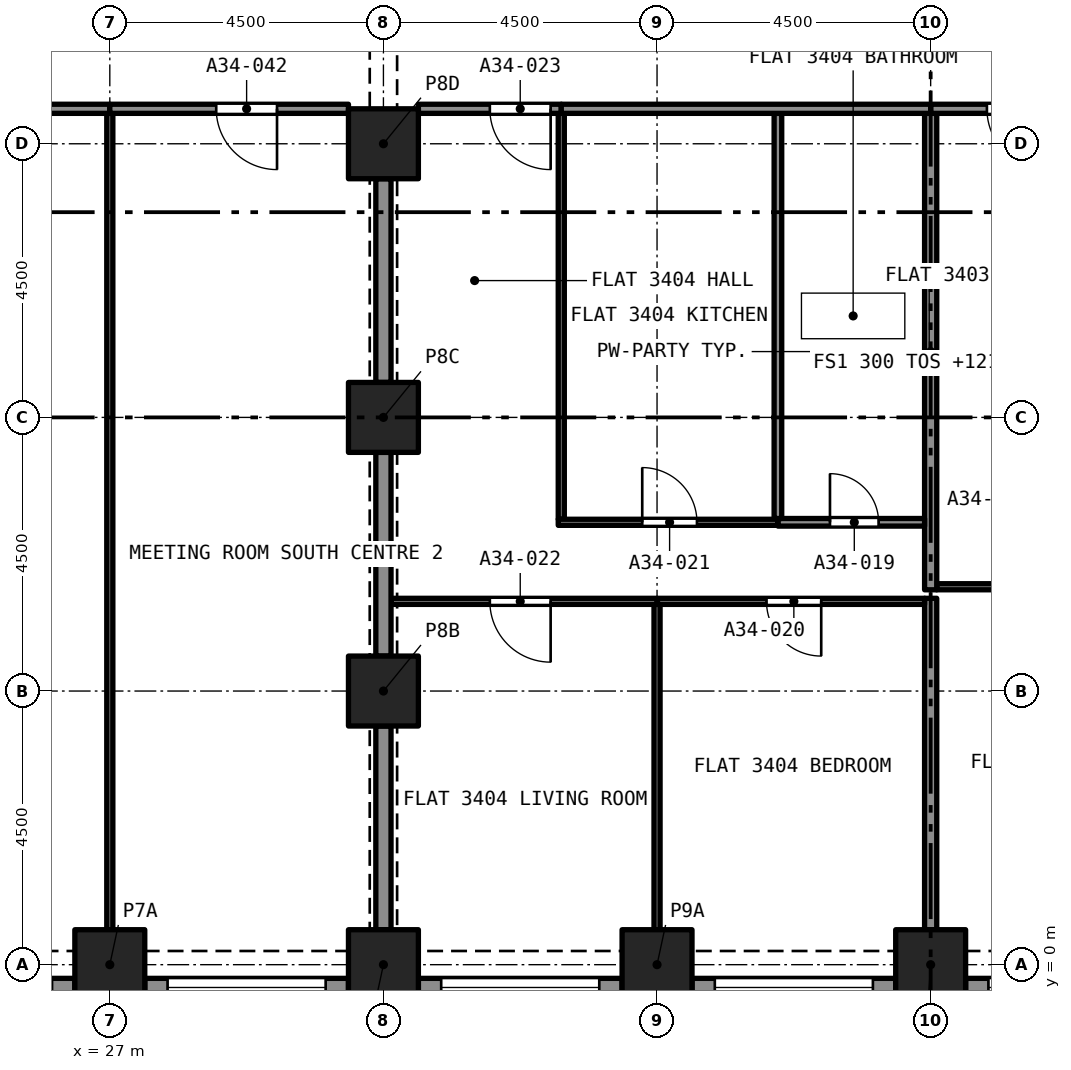
"""IFC4 building model, lengths in metres.
Left out: names, types, materials, properties, quantities, classifications, styles, units other than length and angle.
Written with IfcOpenShell. Run it as: python <this file> out.ifc"""

import sys

from ifc_helpers import new_model, si_unit, direction, frame, frame_2d, origin, origin_2d, place, context, subcontext, project, spatial, rectangle, extrude, element, fill, save


model = new_model("IFC4")
c1 = context("Model", 3, precision=1e-05, world=origin(), true_north=direction((0.0, 1.0)))
c2 = subcontext(c1, "Body", "Model", "MODEL_VIEW")
j1 = project(units=[si_unit("LENGTHUNIT", "METRE"), si_unit("PLANEANGLEUNIT", "RADIAN")], contexts=[c1])
p1 = place(None, origin())
s1 = spatial("IfcSite", under=j1, at=p1, CompositionType="ELEMENT")
p2 = place(p1, origin())
s2 = spatial("IfcBuilding", under=s1, at=p2, CompositionType="ELEMENT")
p3 = place(p2, frame((0.0, 0.0, 121.6)))
s3 = spatial("IfcBuildingStorey", under=s2, at=p3, CompositionType="ELEMENT", Elevation=121.6)
for number, where, z_axis, x_axis in (
    (1, (27.0, 0.0, 0.0), (0.0, 0.0, 1.0), (1.0, 0.0, 0.0)),
    (2, (31.5, 0.0, 0.0), (0.0, 0.0, 1.0), (1.0, 0.0, 0.0)),
    (3, (36.0, 0.0, 0.0), (0.0, 0.0, 1.0), (1.0, 0.0, 0.0)),
    (4, (40.5, 0.0, 0.0), (0.0, 0.0, 1.0), (1.0, 0.0, 0.0)),
    (5, (31.5, 4.5, 0.0), (0.0, 0.0, 1.0), (1.0, 0.0, 0.0)),
    (6, (31.5, 9.0, 0.0), (0.0, 0.0, 1.0), (1.0, 0.0, 0.0)),
    (7, (31.5, 13.5, 0.0), (0.0, 0.0, 1.0), (1.0, 0.0, 0.0)),
):
    element("IfcColumn", number, at=place(p3, frame(where, z_axis=z_axis, x_axis=x_axis)), inside=s3, PredefinedType="COLUMN", context=c2, shape_type="SweptSolid", body=[
        extrude(rectangle(XDim=1.15, YDim=1.15, at=origin_2d()), origin(), (0.0, 0.0, 1.0), 3.2),
    ])
p4 = place(p3, frame((26.425, -0.375, 0.0), z_axis=(0.0, 0.0, 1.0), x_axis=(-1.0, 0.0, 0.0)))
e8 = element("IfcWall", 8, at=p4, inside=s3, PredefinedType="SOLIDWALL", context=c2, shape_type="SweptSolid", body=[
    extrude(rectangle(XDim=3.35, YDim=0.3, at=frame_2d((1.675, 0.0))), origin(), (0.0, 0.0, 1.0), 3.2),
])
p5 = place(p4, frame((0.375, 0.0, 0.45)))
e9 = element("IfcOpeningElement", 9, at=p5, cuts=e8, PredefinedType="OPENING", context=c2, shape_type="SweptSolid", body=[
    extrude(rectangle(XDim=2.6, YDim=1.95, at=frame_2d((1.3, 0.975))), frame((0.0, 0.16, 0.0), z_axis=(0.0, -1.0, 0.0), x_axis=(1.0, 0.0, 0.0)), (0.0, 0.0, 1.0), 0.32),
])
p6 = place(p3, frame((30.925, -0.375, 0.0), z_axis=(0.0, 0.0, 1.0), x_axis=(-1.0, 0.0, 0.0)))
e10 = element("IfcWall", 10, at=p6, inside=s3, PredefinedType="SOLIDWALL", context=c2, shape_type="SweptSolid", body=[
    extrude(rectangle(XDim=3.35, YDim=0.3, at=frame_2d((1.675, 0.0))), origin(), (0.0, 0.0, 1.0), 3.2),
])
p7 = place(p6, frame((0.375, 0.0, 0.45)))
e11 = element("IfcOpeningElement", 11, at=p7, cuts=e10, PredefinedType="OPENING", context=c2, shape_type="SweptSolid", body=[
    extrude(rectangle(XDim=2.6, YDim=1.95, at=frame_2d((1.3, 0.975))), frame((0.0, 0.16, 0.0), z_axis=(0.0, -1.0, 0.0), x_axis=(1.0, 0.0, 0.0)), (0.0, 0.0, 1.0), 0.32),
])
p8 = place(p3, frame((35.425, -0.375, 0.0), z_axis=(0.0, 0.0, 1.0), x_axis=(-1.0, 0.0, 0.0)))
e12 = element("IfcWall", 12, at=p8, inside=s3, PredefinedType="SOLIDWALL", context=c2, shape_type="SweptSolid", body=[
    extrude(rectangle(XDim=3.35, YDim=0.3, at=frame_2d((1.675, 0.0))), origin(), (0.0, 0.0, 1.0), 3.2),
])
p9 = place(p8, frame((0.375, 0.0, 0.45)))
e13 = element("IfcOpeningElement", 13, at=p9, cuts=e12, PredefinedType="OPENING", context=c2, shape_type="SweptSolid", body=[
    extrude(rectangle(XDim=2.6, YDim=1.95, at=frame_2d((1.3, 0.975))), frame((0.0, 0.16, 0.0), z_axis=(0.0, -1.0, 0.0), x_axis=(1.0, 0.0, 0.0)), (0.0, 0.0, 1.0), 0.32),
])
p10 = place(p3, frame((39.925, -0.375, 0.0), z_axis=(0.0, 0.0, 1.0), x_axis=(-1.0, 0.0, 0.0)))
e14 = element("IfcWall", 14, at=p10, inside=s3, PredefinedType="SOLIDWALL", context=c2, shape_type="SweptSolid", body=[
    extrude(rectangle(XDim=3.35, YDim=0.3, at=frame_2d((1.675, 0.0))), origin(), (0.0, 0.0, 1.0), 3.2),
])
p11 = place(p10, frame((0.375, 0.0, 0.45)))
e15 = element("IfcOpeningElement", 15, at=p11, cuts=e14, PredefinedType="OPENING", context=c2, shape_type="SweptSolid", body=[
    extrude(rectangle(XDim=2.6, YDim=1.95, at=frame_2d((1.3, 0.975))), frame((0.0, 0.16, 0.0), z_axis=(0.0, -1.0, 0.0), x_axis=(1.0, 0.0, 0.0)), (0.0, 0.0, 1.0), 0.32),
])
p12 = place(p3, frame((44.425, -0.375, 0.0), z_axis=(0.0, 0.0, 1.0), x_axis=(-1.0, 0.0, 0.0)))
e16 = element("IfcWall", 16, at=p12, inside=s3, PredefinedType="SOLIDWALL", context=c2, shape_type="SweptSolid", body=[
    extrude(rectangle(XDim=3.35, YDim=0.3, at=frame_2d((1.675, 0.0))), origin(), (0.0, 0.0, 1.0), 3.2),
])
p13 = place(p12, frame((0.375, 0.0, 0.45)))
e17 = element("IfcOpeningElement", 17, at=p13, cuts=e16, PredefinedType="OPENING", context=c2, shape_type="SweptSolid", body=[
    extrude(rectangle(XDim=2.6, YDim=1.95, at=frame_2d((1.3, 0.975))), frame((0.0, 0.16, 0.0), z_axis=(0.0, -1.0, 0.0), x_axis=(1.0, 0.0, 0.0)), (0.0, 0.0, 1.0), 0.32),
])
p14 = place(p3, frame((44.95, 6.215, 0.0), z_axis=(0.0, 0.0, 1.0), x_axis=(-1.0, 0.0, 0.0)))
e18 = element("IfcWall", 18, at=p14, inside=s3, PredefinedType="PARTITIONING", context=c2, shape_type="SweptSolid", body=[
    extrude(rectangle(XDim=4.35, YDim=0.1, at=frame_2d((2.175, 0.0))), origin(), (0.0, 0.0, 1.0), 2.85),
])
p15 = place(p14, frame((1.75, 0.0, 0.0)))
e19 = element("IfcOpeningElement", 19, at=p15, cuts=e18, PredefinedType="OPENING", context=c2, shape_type="SweptSolid", body=[
    extrude(rectangle(XDim=0.9, YDim=2.1, at=frame_2d((0.45, 1.05))), frame((0.0, 0.06, 0.0), z_axis=(0.0, -1.0, 0.0), x_axis=(1.0, 0.0, 0.0)), (0.0, 0.0, 1.0), 0.12),
])
p16 = place(p3, frame((40.5, 0.575, 0.0), z_axis=(0.0, 0.0, 1.0), x_axis=(0.0, 1.0, 0.0)))
e20 = element("IfcWall", 20, at=p16, inside=s3, PredefinedType="PARTITIONING", context=c2, shape_type="SweptSolid", body=[
    extrude(rectangle(XDim=5.45, YDim=0.2, at=frame_2d((2.725, 0.0))), origin(), (0.0, 0.0, 1.0), 2.85),
])
p17 = place(p3, frame((40.5, 6.165, 0.0), z_axis=(0.0, 0.0, 1.0), x_axis=(0.0, 1.0, 0.0)))
e21 = element("IfcWall", 21, at=p17, inside=s3, PredefinedType="PARTITIONING", context=c2, shape_type="SweptSolid", body=[
    extrude(rectangle(XDim=7.835, YDim=0.2, at=frame_2d((3.917, 0.0))), origin(), (0.0, 0.0, 1.0), 2.85),
])
p18 = place(p3, frame((42.6, 14.075, 0.0), z_axis=(0.0, 0.0, 1.0), x_axis=(-1.0, 0.0, 0.0)))
e22 = element("IfcWall", 22, at=p18, inside=s3, PredefinedType="PARTITIONING", context=c2, shape_type="SweptSolid", body=[
    extrude(rectangle(XDim=2.1, YDim=0.15, at=frame_2d((1.05, 0.0))), origin(), (0.0, 0.0, 1.0), 2.85),
])
p19 = place(p18, frame((0.175, 0.0, 0.0)))
e23 = element("IfcOpeningElement", 23, at=p19, cuts=e22, PredefinedType="OPENING", context=c2, shape_type="SweptSolid", body=[
    extrude(rectangle(XDim=1.0, YDim=2.1, at=frame_2d((0.5, 1.05))), frame((0.0, 0.085, 0.0), z_axis=(0.0, -1.0, 0.0), x_axis=(1.0, 0.0, 0.0)), (0.0, 0.0, 1.0), 0.17),
])
p20 = place(p3, frame((37.988, 7.275, 0.0), z_axis=(0.0, 0.0, 1.0), x_axis=(1.0, 0.0, 0.0)))
e24 = element("IfcWall", 24, at=p20, inside=s3, PredefinedType="PARTITIONING", context=c2, shape_type="SweptSolid", body=[
    extrude(rectangle(XDim=2.412, YDim=0.125, at=frame_2d((1.206, 0.0))), origin(), (0.0, 0.0, 1.0), 2.85),
])
p21 = place(p20, frame((0.856, 0.0, 0.0)))
e25 = element("IfcOpeningElement", 25, at=p21, cuts=e24, PredefinedType="OPENING", context=c2, shape_type="SweptSolid", body=[
    extrude(rectangle(XDim=0.8, YDim=2.1, at=frame_2d((0.4, 1.05))), frame((0.0, 0.073, 0.0), z_axis=(0.0, -1.0, 0.0), x_axis=(1.0, 0.0, 0.0)), (0.0, 0.0, 1.0), 0.145),
])
p22 = place(p3, frame((37.988, 7.337, 0.0), z_axis=(0.0, 0.0, 1.0), x_axis=(0.0, 1.0, 0.0)))
e26 = element("IfcWall", 26, at=p22, inside=s3, PredefinedType="PARTITIONING", context=c2, shape_type="SweptSolid", body=[
    extrude(rectangle(XDim=6.663, YDim=0.125, at=frame_2d((3.331, 0.0))), origin(), (0.0, 0.0, 1.0), 2.85),
])
p23 = place(p3, frame((40.4, 5.975, 0.0), z_axis=(0.0, 0.0, 1.0), x_axis=(-1.0, 0.0, 0.0)))
e27 = element("IfcWall", 27, at=p23, inside=s3, PredefinedType="PARTITIONING", context=c2, shape_type="SweptSolid", body=[
    extrude(rectangle(XDim=4.4, YDim=0.1, at=frame_2d((2.2, 0.0))), origin(), (0.0, 0.0, 1.0), 2.85),
])
p24 = place(p23, frame((1.7, 0.0, 0.0)))
e28 = element("IfcOpeningElement", 28, at=p24, cuts=e27, PredefinedType="OPENING", context=c2, shape_type="SweptSolid", body=[
    extrude(rectangle(XDim=0.9, YDim=2.1, at=frame_2d((0.45, 1.05))), frame((0.0, 0.06, 0.0), z_axis=(0.0, -1.0, 0.0), x_axis=(1.0, 0.0, 0.0)), (0.0, 0.0, 1.0), 0.12),
])
p25 = place(p3, frame((36.0, 0.575, 0.0), z_axis=(0.0, 0.0, 1.0), x_axis=(0.0, 1.0, 0.0)))
e29 = element("IfcWall", 29, at=p25, inside=s3, PredefinedType="PARTITIONING", context=c2, shape_type="SweptSolid", body=[
    extrude(rectangle(XDim=5.35, YDim=0.1, at=frame_2d((2.675, 0.0))), origin(), (0.0, 0.0, 1.0), 2.85),
])
p26 = place(p3, frame((34.425, 7.325, 0.0), z_axis=(0.0, 0.0, 1.0), x_axis=(0.0, 1.0, 0.0)))
e30 = element("IfcWall", 30, at=p26, inside=s3, PredefinedType="PARTITIONING", context=c2, shape_type="SweptSolid", body=[
    extrude(rectangle(XDim=6.675, YDim=0.1, at=frame_2d((3.337, 0.0))), origin(), (0.0, 0.0, 1.0), 2.85),
])
p27 = place(p3, frame((34.375, 7.275, 0.0), z_axis=(0.0, 0.0, 1.0), x_axis=(1.0, 0.0, 0.0)))
e31 = element("IfcWall", 31, at=p27, inside=s3, PredefinedType="PARTITIONING", context=c2, shape_type="SweptSolid", body=[
    extrude(rectangle(XDim=3.613, YDim=0.1, at=frame_2d((1.807, 0.0))), origin(), (0.0, 0.0, 1.0), 2.85),
])
p28 = place(p27, frame((1.382, 0.0, 0.0)))
e32 = element("IfcOpeningElement", 32, at=p28, cuts=e31, PredefinedType="OPENING", context=c2, shape_type="SweptSolid", body=[
    extrude(rectangle(XDim=0.9, YDim=2.1, at=frame_2d((0.45, 1.05))), frame((0.0, 0.06, 0.0), z_axis=(0.0, -1.0, 0.0), x_axis=(1.0, 0.0, 0.0)), (0.0, 0.0, 1.0), 0.12),
])
p29 = place(p3, frame((36.0, 5.975, 0.0), z_axis=(0.0, 0.0, 1.0), x_axis=(-1.0, 0.0, 0.0)))
e33 = element("IfcWall", 33, at=p29, inside=s3, PredefinedType="PARTITIONING", context=c2, shape_type="SweptSolid", body=[
    extrude(rectangle(XDim=4.375, YDim=0.1, at=frame_2d((2.188, 0.0))), origin(), (0.0, 0.0, 1.0), 2.85),
])
p30 = place(p29, frame((1.75, 0.0, 0.0)))
e34 = element("IfcOpeningElement", 34, at=p30, cuts=e33, PredefinedType="OPENING", context=c2, shape_type="SweptSolid", body=[
    extrude(rectangle(XDim=1.0, YDim=2.1, at=frame_2d((0.5, 1.05))), frame((0.0, 0.06, 0.0), z_axis=(0.0, -1.0, 0.0), x_axis=(1.0, 0.0, 0.0)), (0.0, 0.0, 1.0), 0.12),
])
p31 = place(p3, frame((31.5, 9.575, 0.0), z_axis=(0.0, 0.0, 1.0), x_axis=(0.0, 1.0, 0.0)))
e35 = element("IfcWall", 35, at=p31, inside=s3, PredefinedType="PARTITIONING", context=c2, shape_type="SweptSolid", body=[
    extrude(rectangle(XDim=3.35, YDim=0.25, at=frame_2d((1.675, 0.0))), origin(), (0.0, 0.0, 1.0), 2.38),
])
p32 = place(p3, frame((34.425, 14.075, 0.0), z_axis=(0.0, 0.0, 1.0), x_axis=(-1.0, 0.0, 0.0)))
e36 = element("IfcWall", 36, at=p32, inside=s3, PredefinedType="PARTITIONING", context=c2, shape_type="SweptSolid", body=[
    extrude(rectangle(XDim=2.35, YDim=0.15, at=frame_2d((1.175, 0.0))), origin(), (0.0, 0.0, 1.0), 2.85),
])
p33 = place(p32, frame((0.175, 0.0, 0.0)))
e37 = element("IfcOpeningElement", 37, at=p33, cuts=e36, PredefinedType="OPENING", context=c2, shape_type="SweptSolid", body=[
    extrude(rectangle(XDim=1.0, YDim=2.1, at=frame_2d((0.5, 1.05))), frame((0.0, 0.085, 0.0), z_axis=(0.0, -1.0, 0.0), x_axis=(1.0, 0.0, 0.0)), (0.0, 0.0, 1.0), 0.17),
])
p34 = place(p3, frame((34.425, 14.075, 0.0), z_axis=(0.0, 0.0, 1.0), x_axis=(1.0, 0.0, 0.0)))
e38 = element("IfcWall", 38, at=p34, inside=s3, PredefinedType="PARTITIONING", context=c2, shape_type="SweptSolid", body=[
    extrude(rectangle(XDim=6.075, YDim=0.15, at=frame_2d((3.038, 0.0))), origin(), (0.0, 0.0, 1.0), 2.85),
])
for number, where, z_axis, x_axis in (
    (39, (31.5, 0.575, 0.0), (0.0, 0.0, 1.0), (0.0, 1.0, 0.0)),
    (40, (31.5, 5.075, 0.0), (0.0, 0.0, 1.0), (0.0, 1.0, 0.0)),
):
    element("IfcWall", number, at=place(p3, frame(where, z_axis=z_axis, x_axis=x_axis)), inside=s3, PredefinedType="PARTITIONING", context=c2, shape_type="SweptSolid", body=[
        extrude(rectangle(XDim=3.35, YDim=0.25, at=frame_2d((1.675, 0.0))), origin(), (0.0, 0.0, 1.0), 2.38),
    ])
p35 = place(p3, frame((27.0, 0.575, 0.0), z_axis=(0.0, 0.0, 1.0), x_axis=(0.0, 1.0, 0.0)))
e41 = element("IfcWall", 41, at=p35, inside=s3, PredefinedType="PARTITIONING", context=c2, shape_type="SweptSolid", body=[
    extrude(rectangle(XDim=13.425, YDim=0.1, at=frame_2d((6.712, 0.0))), origin(), (0.0, 0.0, 1.0), 2.75),
])
p36 = place(p3, frame((27.0, 14.075, 0.0), z_axis=(0.0, 0.0, 1.0), x_axis=(-1.0, 0.0, 0.0)))
e42 = element("IfcWall", 42, at=p36, inside=s3, PredefinedType="PARTITIONING", context=c2, shape_type="SweptSolid", body=[
    extrude(rectangle(XDim=4.5, YDim=0.15, at=frame_2d((2.25, 0.0))), origin(), (0.0, 0.0, 1.0), 2.75),
])
p37 = place(p36, frame((1.75, 0.0, 0.0)))
e43 = element("IfcOpeningElement", 43, at=p37, cuts=e42, PredefinedType="OPENING", context=c2, shape_type="SweptSolid", body=[
    extrude(rectangle(XDim=1.0, YDim=2.1, at=frame_2d((0.5, 1.05))), frame((0.0, 0.085, 0.0), z_axis=(0.0, -1.0, 0.0), x_axis=(1.0, 0.0, 0.0)), (0.0, 0.0, 1.0), 0.17),
])
p38 = place(p3, frame((30.925, 14.075, 0.0), z_axis=(0.0, 0.0, 1.0), x_axis=(-1.0, 0.0, 0.0)))
e44 = element("IfcWall", 44, at=p38, inside=s3, PredefinedType="PARTITIONING", context=c2, shape_type="SweptSolid", body=[
    extrude(rectangle(XDim=3.925, YDim=0.15, at=frame_2d((1.962, 0.0))), origin(), (0.0, 0.0, 1.0), 2.75),
])
p39 = place(p38, frame((1.175, 0.0, 0.0)))
e45 = element("IfcOpeningElement", 45, at=p39, cuts=e44, PredefinedType="OPENING", context=c2, shape_type="SweptSolid", body=[
    extrude(rectangle(XDim=1.0, YDim=2.1, at=frame_2d((0.5, 1.05))), frame((0.0, 0.085, 0.0), z_axis=(0.0, -1.0, 0.0), x_axis=(1.0, 0.0, 0.0)), (0.0, 0.0, 1.0), 0.17),
])
p40 = place(p7, origin())
e46 = element("IfcWindow", 46, at=p40, inside=s3, PartitioningType="SINGLE_PANEL", PredefinedType="WINDOW", context=c2, shape_type="SweptSolid", body=[
    extrude(rectangle(XDim=2.6, YDim=1.95, at=frame_2d((1.3, 0.975))), frame((0.0, 0.03, 0.0), z_axis=(0.0, -1.0, 0.0), x_axis=(1.0, 0.0, 0.0)), (0.0, 0.0, 1.0), 0.06),
])
fill(e11, e46)
p41 = place(p9, origin())
e47 = element("IfcWindow", 47, at=p41, inside=s3, PartitioningType="SINGLE_PANEL", PredefinedType="WINDOW", context=c2, shape_type="SweptSolid", body=[
    extrude(rectangle(XDim=2.6, YDim=1.95, at=frame_2d((1.3, 0.975))), frame((0.0, 0.03, 0.0), z_axis=(0.0, -1.0, 0.0), x_axis=(1.0, 0.0, 0.0)), (0.0, 0.0, 1.0), 0.06),
])
fill(e13, e47)
p42 = place(p11, origin())
e48 = element("IfcWindow", 48, at=p42, inside=s3, PartitioningType="SINGLE_PANEL", PredefinedType="WINDOW", context=c2, shape_type="SweptSolid", body=[
    extrude(rectangle(XDim=2.6, YDim=1.95, at=frame_2d((1.3, 0.975))), frame((0.0, 0.03, 0.0), z_axis=(0.0, -1.0, 0.0), x_axis=(1.0, 0.0, 0.0)), (0.0, 0.0, 1.0), 0.06),
])
fill(e15, e48)
p43 = place(p13, origin())
e49 = element("IfcWindow", 49, at=p43, inside=s3, PartitioningType="SINGLE_PANEL", PredefinedType="WINDOW", context=c2, shape_type="SweptSolid", body=[
    extrude(rectangle(XDim=2.6, YDim=1.95, at=frame_2d((1.3, 0.975))), frame((0.0, 0.03, 0.0), z_axis=(0.0, -1.0, 0.0), x_axis=(1.0, 0.0, 0.0)), (0.0, 0.0, 1.0), 0.06),
])
fill(e17, e49)
p44 = place(p19, origin())
e50 = element("IfcDoor", 50, at=p44, inside=s3, OperationType="SINGLE_SWING_LEFT", PredefinedType="DOOR", context=c2, shape_type="SweptSolid", body=[
    extrude(rectangle(XDim=1.0, YDim=2.1, at=frame_2d((0.5, 1.05))), frame((0.0, 0.025, 0.0), z_axis=(0.0, -1.0, 0.0), x_axis=(1.0, 0.0, 0.0)), (0.0, 0.0, 1.0), 0.05),
])
fill(e23, e50)
p45 = place(p21, origin())
e51 = element("IfcDoor", 51, at=p45, inside=s3, OperationType="SINGLE_SWING_RIGHT", PredefinedType="DOOR", context=c2, shape_type="SweptSolid", body=[
    extrude(rectangle(XDim=0.8, YDim=2.1, at=frame_2d((0.4, 1.05))), frame((0.0, 0.025, 0.0), z_axis=(0.0, -1.0, 0.0), x_axis=(1.0, 0.0, 0.0)), (0.0, 0.0, 1.0), 0.05),
])
fill(e25, e51)
p46 = place(p24, origin())
e52 = element("IfcDoor", 52, at=p46, inside=s3, OperationType="SINGLE_SWING_LEFT", PredefinedType="DOOR", context=c2, shape_type="SweptSolid", body=[
    extrude(rectangle(XDim=0.9, YDim=2.1, at=frame_2d((0.45, 1.05))), frame((0.0, 0.025, 0.0), z_axis=(0.0, -1.0, 0.0), x_axis=(1.0, 0.0, 0.0)), (0.0, 0.0, 1.0), 0.05),
])
fill(e28, e52)
p47 = place(p28, origin())
e53 = element("IfcDoor", 53, at=p47, inside=s3, OperationType="SINGLE_SWING_RIGHT", PredefinedType="DOOR", context=c2, shape_type="SweptSolid", body=[
    extrude(rectangle(XDim=0.9, YDim=2.1, at=frame_2d((0.45, 1.05))), frame((0.0, 0.025, 0.0), z_axis=(0.0, -1.0, 0.0), x_axis=(1.0, 0.0, 0.0)), (0.0, 0.0, 1.0), 0.05),
])
fill(e32, e53)
p48 = place(p30, origin())
e54 = element("IfcDoor", 54, at=p48, inside=s3, OperationType="SINGLE_SWING_RIGHT", PredefinedType="DOOR", context=c2, shape_type="SweptSolid", body=[
    extrude(rectangle(XDim=1.0, YDim=2.1, at=frame_2d((0.5, 1.05))), frame((0.0, 0.025, 0.0), z_axis=(0.0, -1.0, 0.0), x_axis=(1.0, 0.0, 0.0)), (0.0, 0.0, 1.0), 0.05),
])
fill(e34, e54)
p49 = place(p33, origin())
e55 = element("IfcDoor", 55, at=p49, inside=s3, OperationType="SINGLE_SWING_LEFT", PredefinedType="DOOR", context=c2, shape_type="SweptSolid", body=[
    extrude(rectangle(XDim=1.0, YDim=2.1, at=frame_2d((0.5, 1.05))), frame((0.0, 0.025, 0.0), z_axis=(0.0, -1.0, 0.0), x_axis=(1.0, 0.0, 0.0)), (0.0, 0.0, 1.0), 0.05),
])
fill(e37, e55)
p50 = place(p39, origin())
e56 = element("IfcDoor", 56, at=p50, inside=s3, OperationType="SINGLE_SWING_LEFT", PredefinedType="DOOR", context=c2, shape_type="SweptSolid", body=[
    extrude(rectangle(XDim=1.0, YDim=2.1, at=frame_2d((0.5, 1.05))), frame((0.0, 0.025, 0.0), z_axis=(0.0, -1.0, 0.0), x_axis=(1.0, 0.0, 0.0)), (0.0, 0.0, 1.0), 0.05),
])
fill(e45, e56)
save(model, sys.argv[1])
